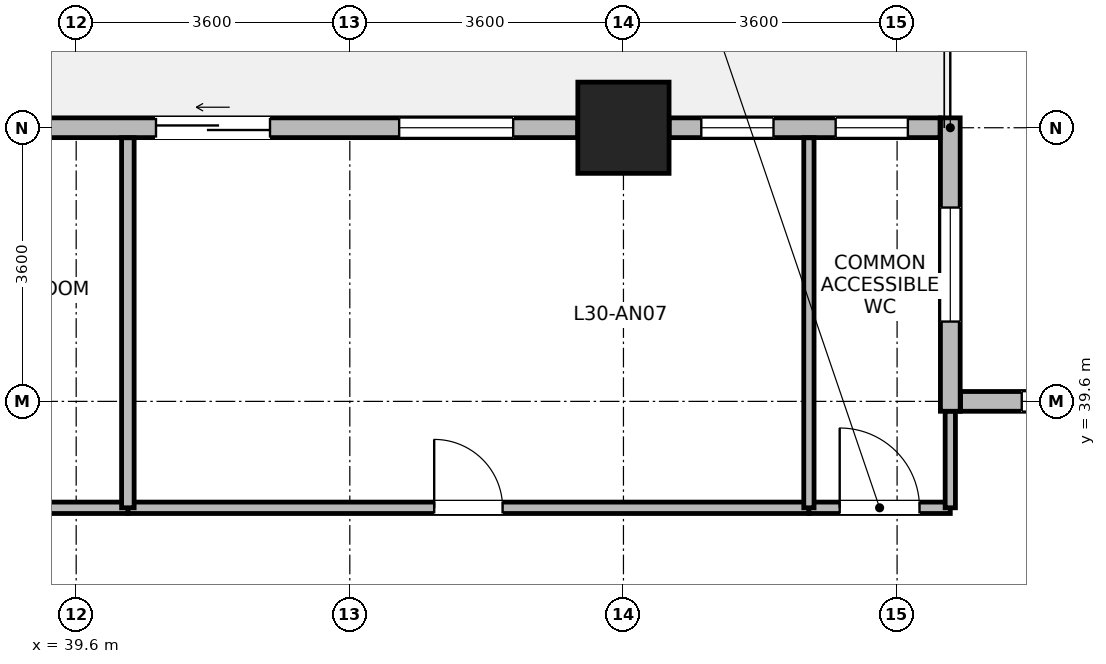
"""IFC4 building model, lengths in metres.
Left out: names, types, materials, properties, quantities, classifications, styles, units other than length and angle.
Written with IfcOpenShell. Run it as: python <this file> out.ifc"""

import sys

from ifc_helpers import new_model, si_unit, direction, frame, frame_2d, origin, origin_2d, place, context, subcontext, project, spatial, rectangle, extrude, source, transform, mapped, element, fill, save


model = new_model("IFC4")
c1 = context("Model", 3, precision=1e-05, world=origin(), true_north=direction((0.0, 1.0)))
c2 = subcontext(c1, "Body", "Model", "MODEL_VIEW")
j1 = project(units=[si_unit("LENGTHUNIT", "METRE"), si_unit("PLANEANGLEUNIT", "RADIAN")], contexts=[c1])
p1 = place(None, origin())
s1 = spatial("IfcSite", under=j1, at=p1, CompositionType="ELEMENT")
p2 = place(p1, origin())
s2 = spatial("IfcBuilding", under=s1, at=p2, CompositionType="ELEMENT")
p3 = place(p2, frame((0.0, 0.0, 119.3)))
s3 = spatial("IfcBuildingStorey", under=s2, at=p3, CompositionType="ELEMENT", Elevation=119.3)
m1 = source(origin(), c2, "Body", "SweptSolid", [
    extrude(rectangle(XDim=1.2, YDim=1.2, at=origin_2d()), origin(), (0.0, 0.0, 1.0), 3.7),
])
p4 = place(p3, frame((46.8, 43.2, 0.0), z_axis=(0.0, 0.0, 1.0), x_axis=(1.0, 0.0, 0.0)))
e1 = element("IfcColumn", 1, at=p4, inside=s3, PredefinedType="COLUMN", context=c2, shape_type="MappedRepresentation", body=[
    mapped(m1, transform((0.0, 0.0, 0.0), x_axis=(1.0, 0.0, 0.0), y_axis=(0.0, 1.0, 0.0), z_axis=(0.0, 0.0, 1.0), scale=1.0)),
])
p5 = place(p3, frame((51.235, 39.6, 0.0), z_axis=(0.0, 0.0, 1.0), x_axis=(1.0, 0.0, 0.0)))
e2 = element("IfcWall", 2, at=p5, inside=s3, PredefinedType="STANDARD", context=c2, shape_type="SweptSolid", body=[
    extrude(rectangle(XDim=9.33, YDim=0.26, at=frame_2d((4.665, 0.0))), origin(), (0.0, 0.0, 1.0), 3.43),
])
p6 = place(p5, frame((0.805, 0.0, 0.85)))
e3 = element("IfcOpeningElement", 3, at=p6, cuts=e2, PredefinedType="OPENING", context=c2, shape_type="SweptSolid", body=[
    extrude(rectangle(XDim=1.5, YDim=1.85, at=frame_2d((0.75, 0.925))), frame((0.0, 0.14, 0.0), z_axis=(0.0, -1.0, 0.0), x_axis=(1.0, 0.0, 0.0)), (0.0, 0.0, 1.0), 0.28),
])
p7 = place(p5, frame((3.915, 0.0, 0.85)))
e4 = element("IfcOpeningElement", 4, at=p7, cuts=e2, PredefinedType="OPENING", context=c2, shape_type="SweptSolid", body=[
    extrude(rectangle(XDim=1.5, YDim=1.85, at=frame_2d((0.75, 0.925))), frame((0.0, 0.14, 0.0), z_axis=(0.0, -1.0, 0.0), x_axis=(1.0, 0.0, 0.0)), (0.0, 0.0, 1.0), 0.28),
])
p8 = place(p5, frame((7.025, 0.0, 0.85)))
e5 = element("IfcOpeningElement", 5, at=p8, cuts=e2, PredefinedType="OPENING", context=c2, shape_type="SweptSolid", body=[
    extrude(rectangle(XDim=1.5, YDim=1.85, at=frame_2d((0.75, 0.925))), frame((0.0, 0.14, 0.0), z_axis=(0.0, -1.0, 0.0), x_axis=(1.0, 0.0, 0.0)), (0.0, 0.0, 1.0), 0.28),
])
p9 = place(p3, frame((51.1, 43.33, 0.0), z_axis=(0.0, 0.0, 1.0), x_axis=(0.0, -1.0, 0.0)))
e6 = element("IfcWall", 6, at=p9, inside=s3, PredefinedType="STANDARD", context=c2, shape_type="SweptSolid", body=[
    extrude(rectangle(XDim=3.86, YDim=0.26, at=frame_2d((1.93, 0.0))), origin(), (0.0, 0.0, 1.0), 3.43),
])
p10 = place(p9, frame((1.18, 0.0, 0.85)))
e7 = element("IfcOpeningElement", 7, at=p10, cuts=e6, PredefinedType="OPENING", context=c2, shape_type="SweptSolid", body=[
    extrude(rectangle(XDim=1.5, YDim=1.85, at=frame_2d((0.75, 0.925))), frame((0.0, 0.14, 0.0), z_axis=(0.0, -1.0, 0.0), x_axis=(1.0, 0.0, 0.0)), (0.0, 0.0, 1.0), 0.28),
])
p11 = place(p3, frame((47.401, 43.2, 0.0), z_axis=(0.0, 0.0, 1.0), x_axis=(1.0, 0.0, 0.0)))
e8 = element("IfcWall", 8, at=p11, inside=s3, PredefinedType="STANDARD", context=c2, shape_type="SweptSolid", body=[
    extrude(rectangle(XDim=3.564, YDim=0.26, at=frame_2d((1.782, 0.0))), origin(), (0.0, 0.0, 1.0), 3.43),
])
p12 = place(p11, frame((0.423, 0.0, 0.85)))
e9 = element("IfcOpeningElement", 9, at=p12, cuts=e8, PredefinedType="OPENING", context=c2, shape_type="SweptSolid", body=[
    extrude(rectangle(XDim=0.95, YDim=1.75, at=frame_2d((0.475, 0.875))), frame((0.0, 0.14, 0.0), z_axis=(0.0, -1.0, 0.0), x_axis=(1.0, 0.0, 0.0)), (0.0, 0.0, 1.0), 0.28),
])
p13 = place(p11, frame((2.191, 0.0, 0.85)))
e10 = element("IfcOpeningElement", 10, at=p13, cuts=e8, PredefinedType="OPENING", context=c2, shape_type="SweptSolid", body=[
    extrude(rectangle(XDim=0.95, YDim=1.75, at=frame_2d((0.475, 0.875))), frame((0.0, 0.14, 0.0), z_axis=(0.0, -1.0, 0.0), x_axis=(1.0, 0.0, 0.0)), (0.0, 0.0, 1.0), 0.28),
])
p14 = place(p3, frame((36.601, 43.2, 0.0), z_axis=(0.0, 0.0, 1.0), x_axis=(1.0, 0.0, 0.0)))
e11 = element("IfcWall", 11, at=p14, inside=s3, PredefinedType="STANDARD", context=c2, shape_type="SweptSolid", body=[
    extrude(rectangle(XDim=9.598, YDim=0.26, at=frame_2d((4.799, 0.0))), origin(), (0.0, 0.0, 1.0), 2.98),
])
p15 = place(p14, frame((4.049, 0.0, 0.0)))
e12 = element("IfcOpeningElement", 12, at=p15, cuts=e11, PredefinedType="OPENING", context=c2, shape_type="SweptSolid", body=[
    extrude(rectangle(XDim=1.5, YDim=2.15, at=frame_2d((0.75, 1.075))), frame((0.0, 0.14, 0.0), z_axis=(0.0, -1.0, 0.0), x_axis=(1.0, 0.0, 0.0)), (0.0, 0.0, 1.0), 0.28),
])
p16 = place(p14, frame((0.85, 0.0, 0.85)))
e13 = element("IfcOpeningElement", 13, at=p16, cuts=e11, PredefinedType="OPENING", context=c2, shape_type="SweptSolid", body=[
    extrude(rectangle(XDim=1.5, YDim=1.85, at=frame_2d((0.75, 0.925))), frame((0.0, 0.14, 0.0), z_axis=(0.0, -1.0, 0.0), x_axis=(1.0, 0.0, 0.0)), (0.0, 0.0, 1.0), 0.28),
])
p17 = place(p14, frame((7.248, 0.0, 0.85)))
e14 = element("IfcOpeningElement", 14, at=p17, cuts=e11, PredefinedType="OPENING", context=c2, shape_type="SweptSolid", body=[
    extrude(rectangle(XDim=1.5, YDim=1.85, at=frame_2d((0.75, 0.925))), frame((0.0, 0.14, 0.0), z_axis=(0.0, -1.0, 0.0), x_axis=(1.0, 0.0, 0.0)), (0.0, 0.0, 1.0), 0.28),
])
p18 = place(p3, frame((40.28, 38.2, 0.0), z_axis=(0.0, 0.0, 1.0), x_axis=(1.0, 0.0, 0.0)))
e15 = element("IfcWall", 15, at=p18, inside=s3, PredefinedType="PARTITIONING", context=c2, shape_type="SweptSolid", body=[
    extrude(rectangle(XDim=8.96, YDim=0.15, at=frame_2d((4.48, 0.0))), origin(), (0.0, 0.0, 1.0), 3.43),
])
p19 = place(p18, frame((4.03, 0.0, 0.0)))
e16 = element("IfcOpeningElement", 16, at=p19, cuts=e15, PredefinedType="OPENING", context=c2, shape_type="SweptSolid", body=[
    extrude(rectangle(XDim=0.9, YDim=2.08, at=frame_2d((0.45, 1.04))), frame((0.0, 0.085, 0.0), z_axis=(0.0, -1.0, 0.0), x_axis=(1.0, 0.0, 0.0)), (0.0, 0.0, 1.0), 0.17),
])
p20 = place(p3, frame((35.42, 38.2, 0.0), z_axis=(0.0, 0.0, 1.0), x_axis=(1.0, 0.0, 0.0)))
e17 = element("IfcWall", 17, at=p20, inside=s3, PredefinedType="PARTITIONING", context=c2, shape_type="SweptSolid", body=[
    extrude(rectangle(XDim=4.86, YDim=0.15, at=frame_2d((2.43, 0.0))), origin(), (0.0, 0.0, 1.0), 3.43),
])
p21 = place(p20, frame((1.955, 0.0, 0.0)))
e18 = element("IfcOpeningElement", 18, at=p21, cuts=e17, PredefinedType="OPENING", context=c2, shape_type="SweptSolid", body=[
    extrude(rectangle(XDim=0.95, YDim=2.1, at=frame_2d((0.475, 1.05))), frame((0.0, 0.085, 0.0), z_axis=(0.0, -1.0, 0.0), x_axis=(1.0, 0.0, 0.0)), (0.0, 0.0, 1.0), 0.17),
])
p22 = place(p3, frame((49.24, 38.2, 0.0), z_axis=(0.0, 0.0, 1.0), x_axis=(1.0, 0.0, 0.0)))
e19 = element("IfcWall", 19, at=p22, inside=s3, PredefinedType="PARTITIONING", context=c2, shape_type="SweptSolid", body=[
    extrude(rectangle(XDim=1.86, YDim=0.15, at=frame_2d((0.93, 0.0))), origin(), (0.0, 0.0, 1.0), 3.43),
])
p23 = place(p22, frame((0.405, 0.0, 0.0)))
e20 = element("IfcOpeningElement", 20, at=p23, cuts=e19, PredefinedType="OPENING", context=c2, shape_type="SweptSolid", body=[
    extrude(rectangle(XDim=1.05, YDim=2.12, at=frame_2d((0.525, 1.06))), frame((0.0, 0.085, 0.0), z_axis=(0.0, -1.0, 0.0), x_axis=(1.0, 0.0, 0.0)), (0.0, 0.0, 1.0), 0.17),
])
p24 = place(p3, frame((40.28, 38.2, 0.0), z_axis=(0.0, 0.0, 1.0), x_axis=(0.0, 1.0, 0.0)))
e21 = element("IfcWall", 21, at=p24, inside=s3, PredefinedType="PARTITIONING", context=c2, shape_type="SweptSolid", body=[
    extrude(rectangle(XDim=4.868, YDim=0.165, at=frame_2d((2.434, 0.0))), origin(), (0.0, 0.0, 1.0), 3.43),
])
p25 = place(p3, frame((49.24, 38.2, 0.0), z_axis=(0.0, 0.0, 1.0), x_axis=(0.0, 1.0, 0.0)))
e22 = element("IfcWall", 22, at=p25, inside=s3, PredefinedType="PARTITIONING", context=c2, shape_type="SweptSolid", body=[
    extrude(rectangle(XDim=4.868, YDim=0.135, at=frame_2d((2.434, 0.0))), origin(), (0.0, 0.0, 1.0), 3.43),
])
p26 = place(p3, frame((51.1, 38.2, 0.0), z_axis=(0.0, 0.0, 1.0), x_axis=(0.0, 1.0, 0.0)))
e23 = element("IfcWall", 23, at=p26, inside=s3, PredefinedType="PARTITIONING", context=c2, shape_type="SweptSolid", body=[
    extrude(rectangle(XDim=1.268, YDim=0.135, at=frame_2d((0.634, 0.0))), origin(), (0.0, 0.0, 1.0), 3.43),
])
p27 = place(p6, origin())
e24 = element("IfcWindow", 24, at=p27, inside=s3, PartitioningType="SINGLE_PANEL", PredefinedType="WINDOW", context=c2, shape_type="SweptSolid", body=[
    extrude(rectangle(XDim=1.5, YDim=1.85, at=frame_2d((0.75, 0.925))), frame((0.0, 0.03, 0.0), z_axis=(0.0, -1.0, 0.0), x_axis=(1.0, 0.0, 0.0)), (0.0, 0.0, 1.0), 0.06),
])
fill(e3, e24)
p28 = place(p10, origin())
e25 = element("IfcWindow", 25, at=p28, inside=s3, PartitioningType="SINGLE_PANEL", PredefinedType="WINDOW", context=c2, shape_type="SweptSolid", body=[
    extrude(rectangle(XDim=1.5, YDim=1.85, at=frame_2d((0.75, 0.925))), frame((0.0, 0.03, 0.0), z_axis=(0.0, -1.0, 0.0), x_axis=(1.0, 0.0, 0.0)), (0.0, 0.0, 1.0), 0.06),
])
fill(e7, e25)
p29 = place(p12, origin())
e26 = element("IfcWindow", 26, at=p29, inside=s3, PartitioningType="SINGLE_PANEL", PredefinedType="WINDOW", context=c2, shape_type="SweptSolid", body=[
    extrude(rectangle(XDim=0.95, YDim=1.75, at=frame_2d((0.475, 0.875))), frame((0.0, 0.03, 0.0), z_axis=(0.0, -1.0, 0.0), x_axis=(1.0, 0.0, 0.0)), (0.0, 0.0, 1.0), 0.06),
])
fill(e9, e26)
p30 = place(p13, origin())
e27 = element("IfcWindow", 27, at=p30, inside=s3, PartitioningType="SINGLE_PANEL", PredefinedType="WINDOW", context=c2, shape_type="SweptSolid", body=[
    extrude(rectangle(XDim=0.95, YDim=1.75, at=frame_2d((0.475, 0.875))), frame((0.0, 0.03, 0.0), z_axis=(0.0, -1.0, 0.0), x_axis=(1.0, 0.0, 0.0)), (0.0, 0.0, 1.0), 0.06),
])
fill(e10, e27)
p31 = place(p15, origin())
e28 = element("IfcDoor", 28, at=p31, inside=s3, OperationType="SLIDING_TO_LEFT", PredefinedType="DOOR", context=c2, shape_type="SweptSolid", body=[
    extrude(rectangle(XDim=1.5, YDim=2.15, at=frame_2d((0.75, 1.075))), frame((0.0, 0.025, 0.0), z_axis=(0.0, -1.0, 0.0), x_axis=(1.0, 0.0, 0.0)), (0.0, 0.0, 1.0), 0.05),
])
fill(e12, e28)
p32 = place(p17, origin())
e29 = element("IfcWindow", 29, at=p32, inside=s3, PartitioningType="SINGLE_PANEL", PredefinedType="WINDOW", context=c2, shape_type="SweptSolid", body=[
    extrude(rectangle(XDim=1.5, YDim=1.85, at=frame_2d((0.75, 0.925))), frame((0.0, 0.03, 0.0), z_axis=(0.0, -1.0, 0.0), x_axis=(1.0, 0.0, 0.0)), (0.0, 0.0, 1.0), 0.06),
])
fill(e14, e29)
p33 = place(p19, origin())
e30 = element("IfcDoor", 30, at=p33, inside=s3, OperationType="SINGLE_SWING_LEFT", PredefinedType="DOOR", context=c2, shape_type="SweptSolid", body=[
    extrude(rectangle(XDim=0.9, YDim=2.08, at=frame_2d((0.45, 1.04))), frame((0.0, 0.025, 0.0), z_axis=(0.0, -1.0, 0.0), x_axis=(1.0, 0.0, 0.0)), (0.0, 0.0, 1.0), 0.05),
])
fill(e16, e30)
p34 = place(p23, origin())
e31 = element("IfcDoor", 31, at=p34, inside=s3, OperationType="SINGLE_SWING_LEFT", PredefinedType="DOOR", context=c2, shape_type="SweptSolid", body=[
    extrude(rectangle(XDim=1.05, YDim=2.12, at=frame_2d((0.525, 1.06))), frame((0.0, 0.025, 0.0), z_axis=(0.0, -1.0, 0.0), x_axis=(1.0, 0.0, 0.0)), (0.0, 0.0, 1.0), 0.05),
])
fill(e20, e31)
save(model, sys.argv[1])
